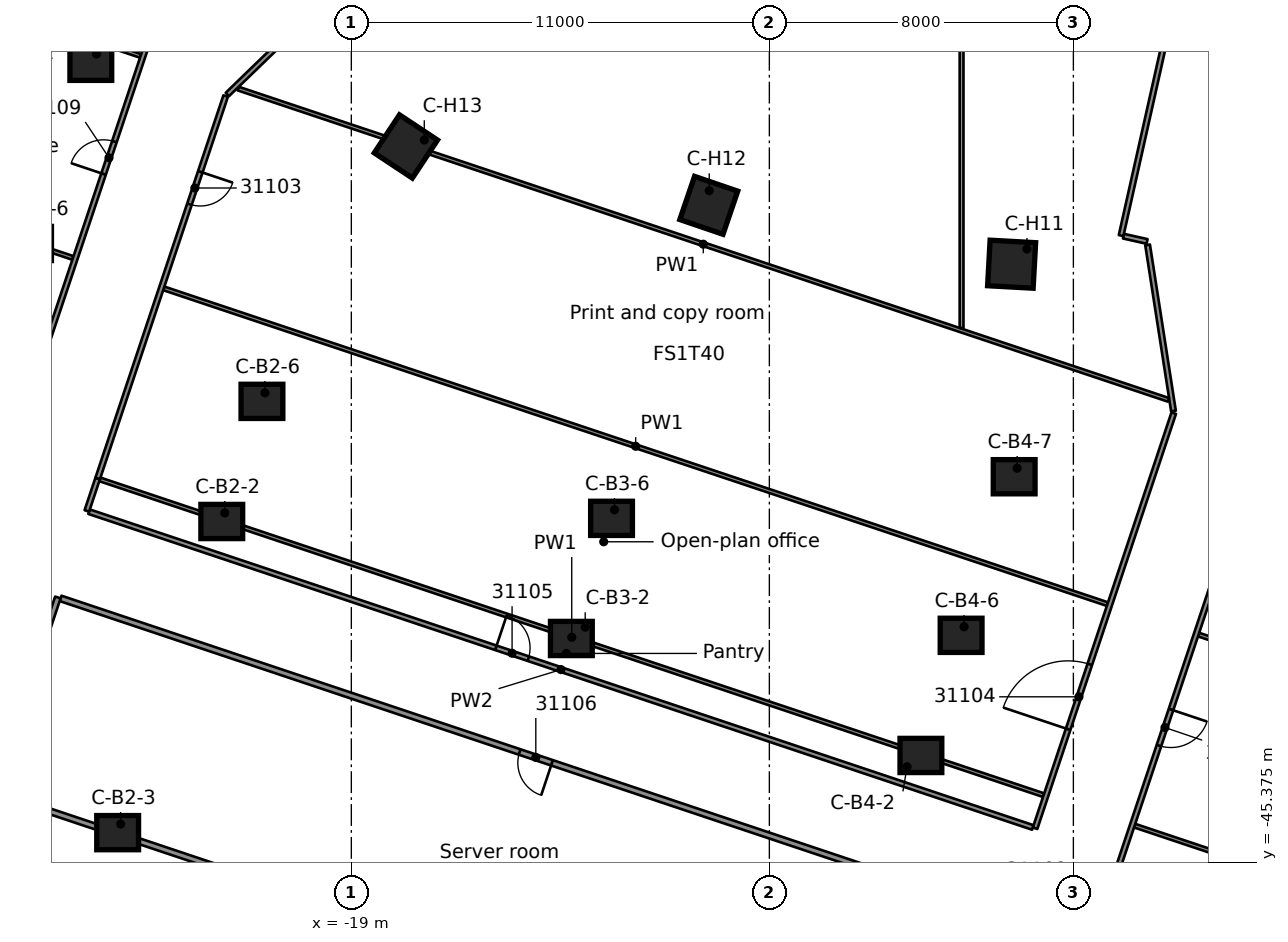
"""IFC4 building model, lengths in metres.
Left out: names, types, materials, properties, quantities, classifications, styles, units other than length and angle.
Written with IfcOpenShell. Run it as: python <this file> out.ifc"""

import sys

from ifc_helpers import new_model, si_unit, direction, frame, frame_2d, origin, origin_2d, place, context, subcontext, project, spatial, rectangle, extrude, element, fill, save


model = new_model("IFC4")
c1 = context("Model", 3, precision=1e-05, world=origin(), true_north=direction((0.0, 1.0)))
c2 = subcontext(c1, "Body", "Model", "MODEL_VIEW")
j1 = project(units=[si_unit("LENGTHUNIT", "METRE"), si_unit("PLANEANGLEUNIT", "RADIAN")], contexts=[c1])
p1 = place(None, origin())
s1 = spatial("IfcSite", under=j1, at=p1, CompositionType="ELEMENT")
p2 = place(p1, origin())
s2 = spatial("IfcBuilding", under=s1, at=p2, CompositionType="ELEMENT")
p3 = place(p2, frame((0.0, 0.0, 156.1)))
s3 = spatial("IfcBuildingStorey", under=s2, at=p3, CompositionType="ELEMENT", Elevation=156.1)
for number, where, z_axis, x_axis in (
    (1, (-25.855, -24.348, 0.0), (0.0, 0.0, 1.0), (1.0, 0.0, 0.0)),
    (2, (-22.409, -36.404, 0.0), (0.0, 0.0, 1.0), (1.0, 0.0, 0.0)),
    (3, (-25.149, -44.591, 0.0), (0.0, 0.0, 1.0), (1.0, 0.0, 0.0)),
    (4, (-21.352, -33.243, 0.0), (0.0, 0.0, 1.0), (1.0, 0.0, 0.0)),
    (5, (-13.21, -39.482, 0.0), (0.0, 0.0, 1.0), (1.0, 0.0, 0.0)),
    (6, (-12.153, -36.321, 0.0), (0.0, 0.0, 1.0), (1.0, 0.0, 0.0)),
    (7, (-4.012, -42.56, 0.0), (0.0, 0.0, 1.0), (1.0, 0.0, 0.0)),
    (8, (-2.954, -39.399, 0.0), (0.0, 0.0, 1.0), (1.0, 0.0, 0.0)),
    (9, (-1.558, -35.226, 0.0), (0.0, 0.0, 1.0), (1.0, 0.0, 0.0)),
):
    element("IfcColumn", number, at=place(p3, frame(where, z_axis=z_axis, x_axis=x_axis)), inside=s3, PredefinedType="COLUMN", context=c2, shape_type="SweptSolid", body=[
        extrude(rectangle(XDim=1.1, YDim=0.9, at=origin_2d()), origin(), (0.0, 0.0, 1.0), 3.5),
    ])
for number, where, z_axis, x_axis in (
    (10, (-1.625, -29.634, 0.0), (0.0, 0.0, 1.0), (-0.055, -0.998, 0.0)),
    (11, (-9.594, -28.085, 0.0), (0.0, 0.0, 1.0), (-0.323, -0.946, 0.0)),
    (12, (-17.564, -26.536, 0.0), (0.0, 0.0, 1.0), (-0.552, -0.834, 0.0)),
):
    element("IfcColumn", number, at=place(p3, frame(where, z_axis=z_axis, x_axis=x_axis)), inside=s3, PredefinedType="COLUMN", context=c2, shape_type="SweptSolid", body=[
        extrude(rectangle(XDim=1.2, YDim=1.2, at=origin_2d()), origin(), (0.0, 0.0, 1.0), 3.5),
    ])
p4 = place(p3, frame((2.634, -33.497, 0.0), z_axis=(0.0, 0.0, 1.0), x_axis=(-0.153972826204, 0.988075082567, 0.0)))
e13 = element("IfcWall", 13, at=p4, inside=s3, PredefinedType="PARTITIONING", context=c2, shape_type="SweptSolid", body=[
    extrude(rectangle(XDim=4.424, YDim=0.125, at=frame_2d((2.212, 0.0))), origin(), (0.0, 0.0, 1.0), 3.08),
])
p5 = place(p3, frame((-28.366, -43.55, 0.0), z_axis=(0.0, 0.0, 1.0), x_axis=(0.948327152728, -0.317294203223, 0.0)))
e14 = element("IfcWall", 14, at=p5, inside=s3, PredefinedType="PARTITIONING", context=c2, shape_type="SweptSolid", body=[
    extrude(rectangle(XDim=26.162, YDim=0.15, at=frame_2d((13.081, 0.0))), origin(), (0.0, 0.0, 1.0), 3.08),
])
p6 = place(p3, frame((-1.841, -46.728, 0.0), z_axis=(0.0, 0.0, 1.0), x_axis=(-0.94832621322, 0.317297011205, 0.0)))
e15 = element("IfcWall", 15, at=p6, inside=s3, PredefinedType="PARTITIONING", context=c2, shape_type="SweptSolid", body=[
    extrude(rectangle(XDim=26.162, YDim=0.15, at=frame_2d((13.081, 0.0))), origin(), (0.0, 0.0, 1.0), 3.08),
])
p7 = place(p6, frame((12.525, 0.0, 0.0)))
e16 = element("IfcOpeningElement", 16, at=p7, cuts=e15, PredefinedType="OPENING", context=c2, shape_type="SweptSolid", body=[
    extrude(rectangle(XDim=0.9, YDim=2.1, at=frame_2d((0.45, 1.05))), frame((0.0, 0.085, 0.0), z_axis=(0.0, -1.0, 0.0), x_axis=(1.0, 0.0, 0.0)), (0.0, 0.0, 1.0), 0.17),
])
p8 = place(p3, frame((-25.901, -36.146, 0.0), z_axis=(0.0, 0.0, 1.0), x_axis=(0.948326561211, -0.317295971139, 0.0)))
e17 = element("IfcWall", 17, at=p8, inside=s3, PredefinedType="PARTITIONING", context=c2, shape_type="SweptSolid", body=[
    extrude(rectangle(XDim=26.187, YDim=0.125, at=frame_2d((13.094, 0.0))), origin(), (0.0, 0.0, 1.0), 3.08),
])
p9 = place(p8, frame((11.288, 0.0, 0.0)))
e18 = element("IfcOpeningElement", 18, at=p9, cuts=e17, PredefinedType="OPENING", context=c2, shape_type="SweptSolid", body=[
    extrude(rectangle(XDim=0.9, YDim=2.1, at=frame_2d((0.45, 1.05))), frame((0.0, 0.073, 0.0), z_axis=(0.0, -1.0, 0.0), x_axis=(1.0, 0.0, 0.0)), (0.0, 0.0, 1.0), 0.145),
])
p10 = place(p3, frame((-25.617, -35.296, 0.0), z_axis=(0.0, 0.0, 1.0), x_axis=(0.948326561211, -0.317295971139, 0.0)))
e19 = element("IfcWall", 19, at=p10, inside=s3, PredefinedType="PARTITIONING", context=c2, shape_type="SweptSolid", body=[
    extrude(rectangle(XDim=26.187, YDim=0.1, at=frame_2d((13.094, 0.0))), origin(), (0.0, 0.0, 1.0), 3.08),
])
p11 = place(p3, frame((1.612, -44.407, 0.0), z_axis=(0.0, 0.0, 1.0), x_axis=(0.948334710824, -0.317271612734, 0.0)))
e20 = element("IfcWall", 20, at=p11, inside=s3, PredefinedType="PARTITIONING", context=c2, shape_type="SweptSolid", body=[
    extrude(rectangle(XDim=4.63, YDim=0.1, at=frame_2d((2.315, 0.0))), origin(), (0.0, 0.0, 1.0), 3.08),
])
p12 = place(p3, frame((-30.722, -27.999, 0.0), z_axis=(0.0, 0.0, 1.0), x_axis=(0.948355935611, -0.317208164132, 0.0)))
e21 = element("IfcWall", 21, at=p12, inside=s3, PredefinedType="PARTITIONING", context=c2, shape_type="SweptSolid", body=[
    extrude(rectangle(XDim=4.631, YDim=0.1, at=frame_2d((2.315, 0.0))), origin(), (0.0, 0.0, 1.0), 3.08),
])
p13 = place(p3, frame((-23.935, -30.27, 0.0), z_axis=(0.0, 0.0, 1.0), x_axis=(0.948326561211, -0.317295971139, 0.0)))
e22 = element("IfcWall", 22, at=p13, inside=s3, PredefinedType="PARTITIONING", context=c2, shape_type="SweptSolid", body=[
    extrude(rectangle(XDim=26.187, YDim=0.1, at=frame_2d((13.094, 0.0))), origin(), (0.0, 0.0, 1.0), 3.08),
])
p14 = place(p3, frame((3.294, -39.38, 0.0), z_axis=(0.0, 0.0, 1.0), x_axis=(0.948260676976, -0.317492816455, 0.0)))
e23 = element("IfcWall", 23, at=p14, inside=s3, PredefinedType="PARTITIONING", context=c2, shape_type="SweptSolid", body=[
    extrude(rectangle(XDim=4.631, YDim=0.1, at=frame_2d((2.315, 0.0))), origin(), (0.0, 0.0, 1.0), 3.08),
])
p15 = place(p3, frame((-28.943, -22.682, 0.0), z_axis=(0.0, 0.0, 1.0), x_axis=(0.948361239818, -0.317192305725, 0.0)))
e24 = element("IfcWall", 24, at=p15, inside=s3, PredefinedType="PARTITIONING", context=c2, shape_type="SweptSolid", body=[
    extrude(rectangle(XDim=4.631, YDim=0.1, at=frame_2d((2.316, 0.0))), origin(), (0.0, 0.0, 1.0), 3.08),
])
p16 = place(p3, frame((-21.98, -25.012, 0.0), z_axis=(0.0, 0.0, 1.0), x_axis=(0.948330909895, -0.317282973603, 0.0)))
e25 = element("IfcWall", 25, at=p16, inside=s3, PredefinedType="PARTITIONING", context=c2, shape_type="SweptSolid", body=[
    extrude(rectangle(XDim=25.816, YDim=0.1, at=frame_2d((12.908, 0.0))), origin(), (0.0, 0.0, 1.0), 3.08),
])
p17 = place(p3, frame((1.317, -28.896, 0.0), z_axis=(0.0, 0.0, 1.0), x_axis=(0.9759612217, -0.217944244563, 0.0)))
e26 = element("IfcWall", 26, at=p17, inside=s3, PredefinedType="PARTITIONING", context=c2, shape_type="SweptSolid", body=[
    extrude(rectangle(XDim=0.637, YDim=0.125, at=frame_2d((0.319, 0.0))), origin(), (0.0, 0.0, 1.0), 3.08),
])
p18 = place(p3, frame((-17.547, -20.605, 0.0), z_axis=(0.0, 0.0, 1.0), x_axis=(-0.718656118165, -0.695365647572, 0.0)))
e27 = element("IfcWall", 27, at=p18, inside=s3, PredefinedType="PARTITIONING", context=c2, shape_type="SweptSolid", body=[
    extrude(rectangle(XDim=6.562, YDim=0.125, at=frame_2d((3.281, 0.0))), origin(), (0.0, 0.0, 1.0), 3.08),
])
p19 = place(p3, frame((5.014, -34.047, 0.0), z_axis=(0.0, 0.0, 1.0), x_axis=(-0.317385597106, -0.948296568986, 0.0)))
e28 = element("IfcWall", 28, at=p19, inside=s3, PredefinedType="PARTITIONING", context=c2, shape_type="SweptSolid", body=[
    extrude(rectangle(XDim=18.151, YDim=0.125, at=frame_2d((9.076, 0.0))), origin(), (0.0, 0.0, 1.0), 3.08),
])
p20 = place(p19, frame((2.347, 0.0, 0.0)))
e29 = element("IfcOpeningElement", 29, at=p20, cuts=e28, PredefinedType="OPENING", context=c2, shape_type="SweptSolid", body=[
    extrude(rectangle(XDim=0.9, YDim=2.1, at=frame_2d((0.45, 1.05))), frame((0.0, 0.073, 0.0), z_axis=(0.0, -1.0, 0.0), x_axis=(1.0, 0.0, 0.0)), (0.0, 0.0, 1.0), 0.145),
])
p21 = place(p19, frame((7.703, 0.0, 0.0)))
e30 = element("IfcOpeningElement", 30, at=p21, cuts=e28, PredefinedType="OPENING", context=c2, shape_type="SweptSolid", body=[
    extrude(rectangle(XDim=1.0, YDim=2.1, at=frame_2d((0.5, 1.05))), frame((0.0, 0.073, 0.0), z_axis=(0.0, -1.0, 0.0), x_axis=(1.0, 0.0, 0.0)), (0.0, 0.0, 1.0), 0.145),
])
p22 = place(p19, frame((12.399, 0.0, 0.0)))
e31 = element("IfcOpeningElement", 31, at=p22, cuts=e28, PredefinedType="OPENING", context=c2, shape_type="SweptSolid", body=[
    extrude(rectangle(XDim=1.0, YDim=2.1, at=frame_2d((0.5, 1.05))), frame((0.0, 0.073, 0.0), z_axis=(0.0, -1.0, 0.0), x_axis=(1.0, 0.0, 0.0)), (0.0, 0.0, 1.0), 0.145),
])
p23 = place(p3, frame((-1.008, -44.475, 0.0), z_axis=(0.0, 0.0, 1.0), x_axis=(0.316889155775, 0.948462578572, 0.0)))
e32 = element("IfcWall", 32, at=p23, inside=s3, PredefinedType="PARTITIONING", context=c2, shape_type="SweptSolid", body=[
    extrude(rectangle(XDim=11.516, YDim=0.125, at=frame_2d((5.758, 0.0))), origin(), (0.0, 0.0, 1.0), 3.08),
])
p24 = place(p23, frame((2.746, 0.0, 0.0)))
e33 = element("IfcOpeningElement", 33, at=p24, cuts=e32, PredefinedType="OPENING", context=c2, shape_type="SweptSolid", body=[
    extrude(rectangle(XDim=1.8, YDim=2.1, at=frame_2d((0.9, 1.05))), frame((0.0, 0.073, 0.0), z_axis=(0.0, -1.0, 0.0), x_axis=(1.0, 0.0, 0.0)), (0.0, 0.0, 1.0), 0.145),
])
p25 = place(p3, frame((-27.976, -42.15, 0.0), z_axis=(0.0, 0.0, 1.0), x_axis=(0.317413881712, 0.948287101935, 0.0)))
e34 = element("IfcWall", 34, at=p25, inside=s3, PredefinedType="PARTITIONING", context=c2, shape_type="SweptSolid", body=[
    extrude(rectangle(XDim=3.951, YDim=0.15, at=frame_2d((1.976, 0.0))), origin(), (0.0, 0.0, 1.0), 3.08),
])
p26 = place(p3, frame((-22.307, -25.21, 0.0), z_axis=(0.0, 0.0, 1.0), x_axis=(-0.317400526235, -0.948291572221, 0.0)))
e35 = element("IfcWall", 35, at=p26, inside=s3, PredefinedType="PARTITIONING", context=c2, shape_type="SweptSolid", body=[
    extrude(rectangle(XDim=10.615, YDim=0.125, at=frame_2d((5.307, 0.0))), origin(), (0.0, 0.0, 1.0), 3.08),
])
p27 = place(p26, frame((2.101, 0.0, 0.0)))
e36 = element("IfcOpeningElement", 36, at=p27, cuts=e35, PredefinedType="OPENING", context=c2, shape_type="SweptSolid", body=[
    extrude(rectangle(XDim=0.9, YDim=2.1, at=frame_2d((0.45, 1.05))), frame((0.0, 0.073, 0.0), z_axis=(0.0, -1.0, 0.0), x_axis=(1.0, 0.0, 0.0)), (0.0, 0.0, 1.0), 0.145),
])
p28 = place(p3, frame((-25.96, -36.126, 0.0), z_axis=(0.0, 0.0, 1.0), x_axis=(0.316799745903, 0.948492446462, 0.0)))
e37 = element("IfcWall", 37, at=p28, inside=s3, PredefinedType="PARTITIONING", context=c2, shape_type="SweptSolid", body=[
    extrude(rectangle(XDim=0.896, YDim=0.125, at=frame_2d((0.448, 0.0))), origin(), (0.0, 0.0, 1.0), 3.08),
])
p29 = place(p3, frame((-30.714, -42.764, 0.0), z_axis=(0.0, 0.0, 1.0), x_axis=(0.317699123241, 0.94819157721, 0.0)))
e38 = element("IfcWall", 38, at=p29, inside=s3, PredefinedType="PARTITIONING", context=c2, shape_type="SweptSolid", body=[
    extrude(rectangle(XDim=19.906, YDim=0.125, at=frame_2d((9.953, 0.0))), origin(), (0.0, 0.0, 1.0), 3.08),
])
p30 = place(p29, frame((16.35, 0.0, 0.0)))
e39 = element("IfcOpeningElement", 39, at=p30, cuts=e38, PredefinedType="OPENING", context=c2, shape_type="SweptSolid", body=[
    extrude(rectangle(XDim=0.9, YDim=2.1, at=frame_2d((0.45, 1.05))), frame((0.0, 0.073, 0.0), z_axis=(0.0, -1.0, 0.0), x_axis=(1.0, 0.0, 0.0)), (0.0, 0.0, 1.0), 0.145),
])
p31 = place(p29, frame((10.8, 0.0, 0.0)))
e40 = element("IfcOpeningElement", 40, at=p31, cuts=e38, PredefinedType="OPENING", context=c2, shape_type="SweptSolid", body=[
    extrude(rectangle(XDim=0.9, YDim=2.1, at=frame_2d((0.45, 1.05))), frame((0.0, 0.073, 0.0), z_axis=(0.0, -1.0, 0.0), x_axis=(1.0, 0.0, 0.0)), (0.0, 0.0, 1.0), 0.145),
])
p32 = place(p29, frame((3.051, 0.0, 0.0)))
e41 = element("IfcOpeningElement", 41, at=p32, cuts=e38, PredefinedType="OPENING", context=c2, shape_type="SweptSolid", body=[
    extrude(rectangle(XDim=0.9, YDim=2.1, at=frame_2d((0.45, 1.05))), frame((0.0, 0.073, 0.0), z_axis=(0.0, -1.0, 0.0), x_axis=(1.0, 0.0, 0.0)), (0.0, 0.0, 1.0), 0.145),
])
p33 = place(p3, frame((1.256, -28.881, 0.0), z_axis=(0.0, 0.0, 1.0), x_axis=(0.218920699835, 0.975742654179, 0.0)))
e42 = element("IfcWall", 42, at=p33, inside=s3, PredefinedType="PARTITIONING", context=c2, shape_type="SweptSolid", body=[
    extrude(rectangle(XDim=11.895, YDim=0.125, at=frame_2d((5.947, 0.0))), origin(), (0.0, 0.0, 1.0), 3.08),
])
p34 = place(p33, frame((5.6, 0.0, 0.0)))
e43 = element("IfcOpeningElement", 43, at=p34, cuts=e42, PredefinedType="OPENING", context=c2, shape_type="SweptSolid", body=[
    extrude(rectangle(XDim=0.9, YDim=2.1, at=frame_2d((0.45, 1.05))), frame((0.0, 0.073, 0.0), z_axis=(0.0, -1.0, 0.0), x_axis=(1.0, 0.0, 0.0)), (0.0, 0.0, 1.0), 0.145),
])
p35 = place(p3, frame((-2.942, -31.313, 0.0), z_axis=(0.0, 0.0, 1.0), x_axis=(0.0, 1.0, 0.0)))
e44 = element("IfcWall", 44, at=p35, inside=s3, PredefinedType="PARTITIONING", context=c2, shape_type="SweptSolid", body=[
    extrude(rectangle(XDim=16.85, YDim=0.1, at=frame_2d((8.425, 0.0))), origin(), (0.0, 0.0, 1.0), 3.08),
])
p36 = place(p21, origin())
e45 = element("IfcDoor", 45, at=p36, inside=s3, OperationType="SINGLE_SWING_LEFT", PredefinedType="DOOR", context=c2, shape_type="SweptSolid", body=[
    extrude(rectangle(XDim=1.0, YDim=2.1, at=frame_2d((0.5, 1.05))), frame((0.0, 0.025, 0.0), z_axis=(0.0, -1.0, 0.0), x_axis=(1.0, 0.0, 0.0)), (0.0, 0.0, 1.0), 0.05),
])
fill(e30, e45)
p37 = place(p27, origin())
e46 = element("IfcDoor", 46, at=p37, inside=s3, OperationType="SINGLE_SWING_LEFT", PredefinedType="DOOR", context=c2, shape_type="SweptSolid", body=[
    extrude(rectangle(XDim=0.9, YDim=2.1, at=frame_2d((0.45, 1.05))), frame((0.0, 0.025, 0.0), z_axis=(0.0, -1.0, 0.0), x_axis=(1.0, 0.0, 0.0)), (0.0, 0.0, 1.0), 0.05),
])
fill(e36, e46)
p38 = place(p24, origin())
e47 = element("IfcDoor", 47, at=p38, inside=s3, OperationType="DOUBLE_DOOR_SINGLE_SWING", PredefinedType="DOOR", context=c2, shape_type="SweptSolid", body=[
    extrude(rectangle(XDim=1.8, YDim=2.1, at=frame_2d((0.9, 1.05))), frame((0.0, 0.025, 0.0), z_axis=(0.0, -1.0, 0.0), x_axis=(1.0, 0.0, 0.0)), (0.0, 0.0, 1.0), 0.05),
])
fill(e33, e47)
p39 = place(p9, origin())
e48 = element("IfcDoor", 48, at=p39, inside=s3, OperationType="SINGLE_SWING_LEFT", PredefinedType="DOOR", context=c2, shape_type="SweptSolid", body=[
    extrude(rectangle(XDim=0.9, YDim=2.1, at=frame_2d((0.45, 1.05))), frame((0.0, 0.025, 0.0), z_axis=(0.0, -1.0, 0.0), x_axis=(1.0, 0.0, 0.0)), (0.0, 0.0, 1.0), 0.05),
])
fill(e18, e48)
p40 = place(p7, origin())
e49 = element("IfcDoor", 49, at=p40, inside=s3, OperationType="SINGLE_SWING_LEFT", PredefinedType="DOOR", context=c2, shape_type="SweptSolid", body=[
    extrude(rectangle(XDim=0.9, YDim=2.1, at=frame_2d((0.45, 1.05))), frame((0.0, 0.025, 0.0), z_axis=(0.0, -1.0, 0.0), x_axis=(1.0, 0.0, 0.0)), (0.0, 0.0, 1.0), 0.05),
])
fill(e16, e49)
p41 = place(p30, origin())
e50 = element("IfcDoor", 50, at=p41, inside=s3, OperationType="SINGLE_SWING_RIGHT", PredefinedType="DOOR", context=c2, shape_type="SweptSolid", body=[
    extrude(rectangle(XDim=0.9, YDim=2.1, at=frame_2d((0.45, 1.05))), frame((0.0, 0.025, 0.0), z_axis=(0.0, -1.0, 0.0), x_axis=(1.0, 0.0, 0.0)), (0.0, 0.0, 1.0), 0.05),
])
fill(e39, e50)
save(model, sys.argv[1])
